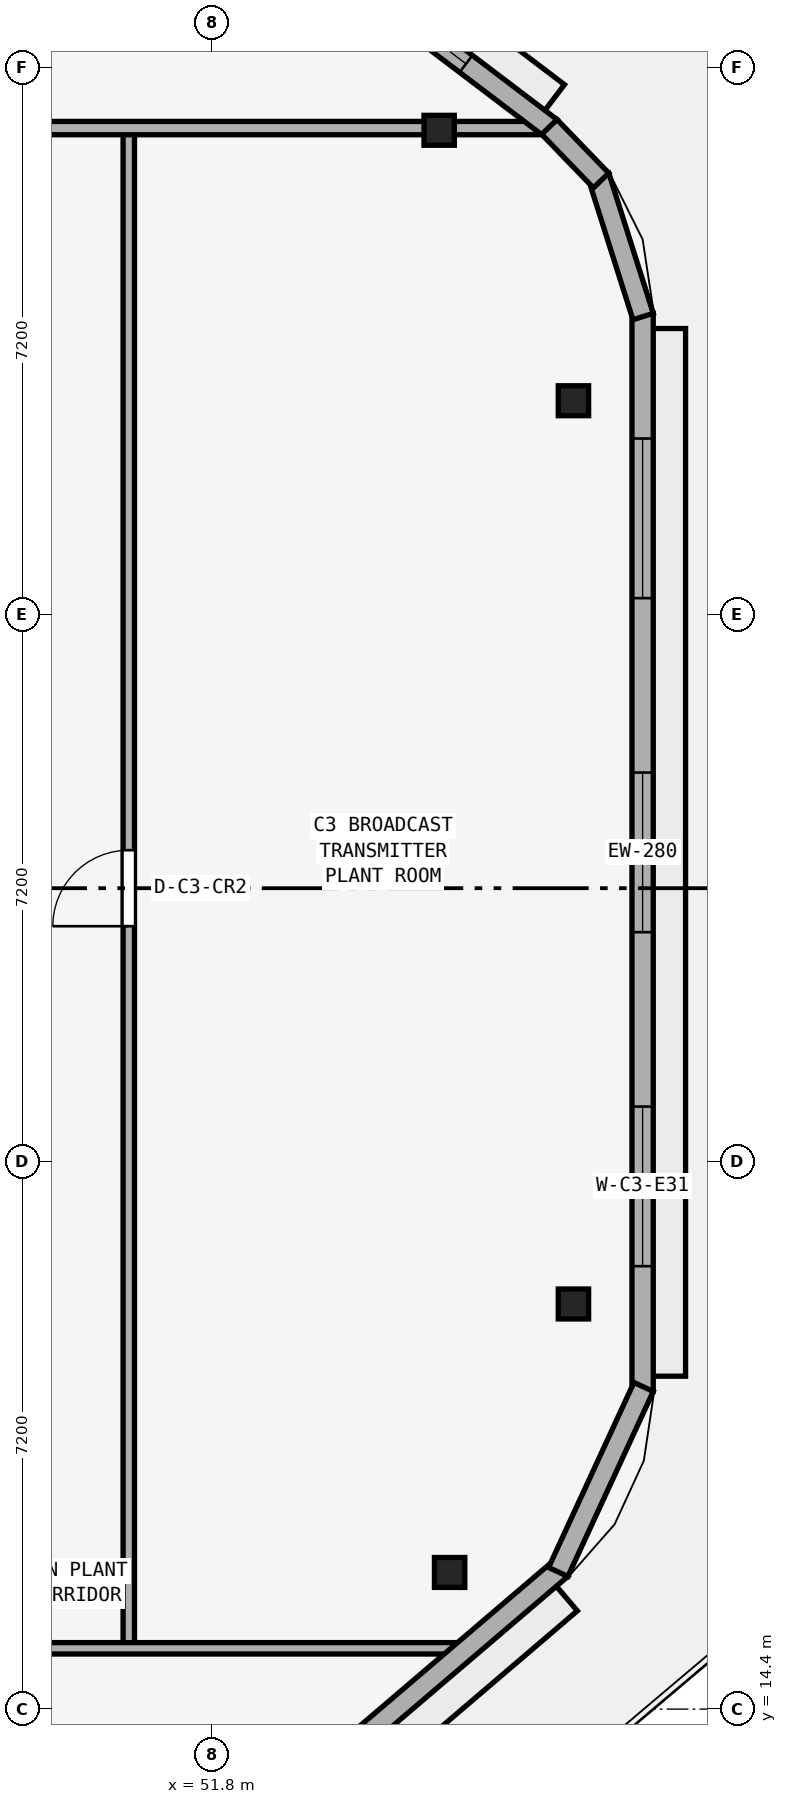
"""IFC4 building model, lengths in metres.
Left out: names, types, materials, properties, quantities, classifications, styles, units other than length and angle.
Written with IfcOpenShell. Run it as: python <this file> out.ifc"""

import sys

from ifc_helpers import new_model, si_unit, direction, frame, frame_2d, origin, origin_2d, place, context, subcontext, project, spatial, rectangle, i_section, extrude, element, fill, save


model = new_model("IFC4")
c1 = context("Model", 3, precision=1e-05, world=origin(), true_north=direction((0.0, 1.0)))
c2 = subcontext(c1, "Body", "Model", "MODEL_VIEW")
j1 = project(units=[si_unit("LENGTHUNIT", "METRE"), si_unit("PLANEANGLEUNIT", "RADIAN")], contexts=[c1])
p1 = place(None, origin())
s1 = spatial("IfcSite", under=j1, at=p1, CompositionType="ELEMENT")
p2 = place(p1, origin())
s2 = spatial("IfcBuilding", under=s1, at=p2, CompositionType="ELEMENT")
p3 = place(p2, frame((0.0, 0.0, 321.4)))
s3 = spatial("IfcBuildingStorey", under=s2, at=p3, CompositionType="ELEMENT", Elevation=321.4)
for number, where, z_axis, x_axis in (
    (1, (54.921, 16.198, 0.0), (0.0, 0.0, 1.0), (1.0, 0.0, 0.0)),
    (2, (56.55, 19.73, 0.0), (0.0, 0.0, 1.0), (1.0, 0.0, 0.0)),
    (3, (56.55, 31.613, 0.0), (0.0, 0.0, 1.0), (1.0, 0.0, 0.0)),
    (4, (54.783, 35.171, 0.0), (0.0, 0.0, 1.0), (1.0, 0.0, 0.0)),
):
    element("IfcColumn", number, at=place(p3, frame(where, z_axis=z_axis, x_axis=x_axis)), inside=s3, PredefinedType="COLUMN", context=c2, shape_type="SweptSolid", body=[
        extrude(i_section(OverallWidth=0.399, OverallDepth=0.394, WebThickness=0.023, FlangeThickness=0.037, at=origin_2d()), origin(), (0.0, 0.0, 1.0), 4.0),
    ])
p4 = place(p3, frame((50.7, 15.2, 0.0), z_axis=(0.0, 0.0, 1.0), x_axis=(0.0, 1.0, 0.0)))
e5 = element("IfcWall", 5, at=p4, inside=s3, PredefinedType="PARTITIONING", context=c2, shape_type="SweptSolid", body=[
    extrude(rectangle(XDim=20.0, YDim=0.15, at=frame_2d((10.0, 0.0))), origin(), (0.0, 0.0, 1.0), 3.72),
])
p5 = place(p4, frame((9.5, 0.0, 0.0)))
e6 = element("IfcOpeningElement", 6, at=p5, cuts=e5, PredefinedType="OPENING", context=c2, shape_type="SweptSolid", body=[
    extrude(rectangle(XDim=1.0, YDim=2.12, at=frame_2d((0.5, 1.06))), frame((0.0, 0.085, 0.0), z_axis=(0.0, -1.0, 0.0), x_axis=(1.0, 0.0, 0.0)), (0.0, 0.0, 1.0), 0.17),
])
p6 = place(p3, frame((24.464, 15.2, 0.0), z_axis=(0.0, 0.0, 1.0), x_axis=(1.0, 0.0, 0.0)))
e7 = element("IfcWall", 7, at=p6, inside=s3, PredefinedType="PARTITIONING", context=c2, shape_type="SweptSolid", body=[
    extrude(rectangle(XDim=30.765, YDim=0.15, at=frame_2d((15.383, 0.0))), origin(), (0.0, 0.0, 1.0), 3.72),
])
p7 = place(p6, frame((14.536, 0.0, 0.0)))
e8 = element("IfcOpeningElement", 8, at=p7, cuts=e7, PredefinedType="OPENING", context=c2, shape_type="SweptSolid", body=[
    extrude(rectangle(XDim=1.0, YDim=2.12, at=frame_2d((0.5, 1.06))), frame((0.0, 0.085, 0.0), z_axis=(0.0, -1.0, 0.0), x_axis=(1.0, 0.0, 0.0)), (0.0, 0.0, 1.0), 0.17),
])
p8 = place(p3, frame((25.074, 35.2, 0.0), z_axis=(0.0, 0.0, 1.0), x_axis=(1.0, 0.0, 0.0)))
e9 = element("IfcWall", 9, at=p8, inside=s3, PredefinedType="PARTITIONING", context=c2, shape_type="SweptSolid", body=[
    extrude(rectangle(XDim=31.228, YDim=0.175, at=frame_2d((15.614, 0.0))), origin(), (0.0, 0.0, 1.0), 3.72),
])
p9 = place(p8, frame((13.926, 0.0, 0.0)))
e10 = element("IfcOpeningElement", 10, at=p9, cuts=e9, PredefinedType="OPENING", context=c2, shape_type="SweptSolid", body=[
    extrude(rectangle(XDim=1.0, YDim=2.12, at=frame_2d((0.5, 1.06))), frame((0.0, 0.097, 0.0), z_axis=(0.0, -1.0, 0.0), x_axis=(1.0, 0.0, 0.0)), (0.0, 0.0, 1.0), 0.195),
])
p10 = place(p3, frame((47.371, 8.558, 0.0), z_axis=(0.0, 0.0, 1.0), x_axis=(0.760637685394, 0.649176641261, 0.0)))
e11 = element("IfcWall", 11, at=p10, inside=s3, PredefinedType="STANDARD", context=c2, shape_type="SweptSolid", body=[
    extrude(rectangle(XDim=11.852, YDim=0.28, at=frame_2d((5.926, 0.0))), origin(), (0.0, 0.0, 1.0), 3.72),
])
p11 = place(p10, frame((1.509, 0.0, 0.9)))
e12 = element("IfcOpeningElement", 12, at=p11, cuts=e11, PredefinedType="OPENING", context=c2, shape_type="SweptSolid", body=[
    extrude(rectangle(XDim=1.6, YDim=1.45, at=frame_2d((0.8, 0.725))), frame((0.0, 0.15, 0.0), z_axis=(0.0, -1.0, 0.0), x_axis=(1.0, 0.0, 0.0)), (0.0, 0.0, 1.0), 0.3),
])
p12 = place(p10, frame((5.126, 0.0, 0.9)))
e13 = element("IfcOpeningElement", 13, at=p12, cuts=e11, PredefinedType="OPENING", context=c2, shape_type="SweptSolid", body=[
    extrude(rectangle(XDim=1.6, YDim=1.45, at=frame_2d((0.8, 0.725))), frame((0.0, 0.15, 0.0), z_axis=(0.0, -1.0, 0.0), x_axis=(1.0, 0.0, 0.0)), (0.0, 0.0, 1.0), 0.3),
])
p13 = place(p3, frame((57.46, 18.58, 0.0), z_axis=(0.0, 0.0, 1.0), x_axis=(0.0, 1.0, 0.0)))
e14 = element("IfcWall", 14, at=p13, inside=s3, PredefinedType="STANDARD", context=c2, shape_type="SweptSolid", body=[
    extrude(rectangle(XDim=14.183, YDim=0.28, at=frame_2d((7.092, 0.0))), origin(), (0.0, 0.0, 1.0), 3.72),
])
p14 = place(p13, frame((1.647, 0.0, 0.9)))
e15 = element("IfcOpeningElement", 15, at=p14, cuts=e14, PredefinedType="OPENING", context=c2, shape_type="SweptSolid", body=[
    extrude(rectangle(XDim=2.1, YDim=1.7, at=frame_2d((1.05, 0.85))), frame((0.0, 0.15, 0.0), z_axis=(0.0, -1.0, 0.0), x_axis=(1.0, 0.0, 0.0)), (0.0, 0.0, 1.0), 0.3),
])
p15 = place(p13, frame((6.042, 0.0, 0.9)))
e16 = element("IfcOpeningElement", 16, at=p15, cuts=e14, PredefinedType="OPENING", context=c2, shape_type="SweptSolid", body=[
    extrude(rectangle(XDim=2.1, YDim=1.7, at=frame_2d((1.05, 0.85))), frame((0.0, 0.15, 0.0), z_axis=(0.0, -1.0, 0.0), x_axis=(1.0, 0.0, 0.0)), (0.0, 0.0, 1.0), 0.3),
])
p16 = place(p13, frame((10.436, 0.0, 0.9)))
e17 = element("IfcOpeningElement", 17, at=p16, cuts=e14, PredefinedType="OPENING", context=c2, shape_type="SweptSolid", body=[
    extrude(rectangle(XDim=2.1, YDim=1.7, at=frame_2d((1.05, 0.85))), frame((0.0, 0.15, 0.0), z_axis=(0.0, -1.0, 0.0), x_axis=(1.0, 0.0, 0.0)), (0.0, 0.0, 1.0), 0.3),
])
p17 = place(p3, frame((56.25, 35.201, 0.0), z_axis=(0.0, 0.0, 1.0), x_axis=(-0.796694895732, 0.60438170316, 0.0)))
e18 = element("IfcWall", 18, at=p17, inside=s3, PredefinedType="STANDARD", context=c2, shape_type="SweptSolid", body=[
    extrude(rectangle(XDim=11.183, YDim=0.28, at=frame_2d((5.591, 0.0))), origin(), (0.0, 0.0, 1.0), 3.72),
])
p18 = place(p17, frame((1.397, 0.0, 0.9)))
e19 = element("IfcOpeningElement", 19, at=p18, cuts=e18, PredefinedType="OPENING", context=c2, shape_type="SweptSolid", body=[
    extrude(rectangle(XDim=1.6, YDim=1.45, at=frame_2d((0.8, 0.725))), frame((0.0, 0.15, 0.0), z_axis=(0.0, -1.0, 0.0), x_axis=(1.0, 0.0, 0.0)), (0.0, 0.0, 1.0), 0.3),
])
p19 = place(p17, frame((4.792, 0.0, 0.9)))
e20 = element("IfcOpeningElement", 20, at=p19, cuts=e18, PredefinedType="OPENING", context=c2, shape_type="SweptSolid", body=[
    extrude(rectangle(XDim=1.6, YDim=1.45, at=frame_2d((0.8, 0.725))), frame((0.0, 0.15, 0.0), z_axis=(0.0, -1.0, 0.0), x_axis=(1.0, 0.0, 0.0)), (0.0, 0.0, 1.0), 0.3),
])
p20 = place(p17, frame((8.186, 0.0, 0.9)))
e21 = element("IfcOpeningElement", 21, at=p20, cuts=e18, PredefinedType="OPENING", context=c2, shape_type="SweptSolid", body=[
    extrude(rectangle(XDim=1.6, YDim=1.45, at=frame_2d((0.8, 0.725))), frame((0.0, 0.15, 0.0), z_axis=(0.0, -1.0, 0.0), x_axis=(1.0, 0.0, 0.0)), (0.0, 0.0, 1.0), 0.3),
])
p21 = place(p3, frame((56.35, 16.205, 0.0), z_axis=(0.0, 0.0, 1.0), x_axis=(0.418902215131, 0.908031350868, 0.0)))
e22 = element("IfcWall", 22, at=p21, inside=s3, PredefinedType="STANDARD", context=c2, shape_type="SweptSolid", body=[
    extrude(rectangle(XDim=2.68, YDim=0.28, at=frame_2d((1.34, 0.0))), origin(), (0.0, 0.0, 1.0), 3.72),
])
p22 = place(p3, frame((57.467, 32.721, 0.0), z_axis=(0.0, 0.0, 1.0), x_axis=(-0.302459091708, 0.953162366988, 0.0)))
e23 = element("IfcWall", 23, at=p22, inside=s3, PredefinedType="STANDARD", context=c2, shape_type="SweptSolid", body=[
    extrude(rectangle(XDim=1.936, YDim=0.28, at=frame_2d((0.968, 0.0))), origin(), (0.0, 0.0, 1.0), 3.72),
])
p23 = place(p3, frame((56.914, 34.511, 0.0), z_axis=(0.0, 0.0, 1.0), x_axis=(-0.694785794461, 0.719216726595, 0.0)))
e24 = element("IfcWall", 24, at=p23, inside=s3, PredefinedType="STANDARD", context=c2, shape_type="SweptSolid", body=[
    extrude(rectangle(XDim=0.979, YDim=0.28, at=frame_2d((0.49, 0.0))), origin(), (0.0, 0.0, 1.0), 3.72),
])
p24 = place(p5, origin())
e25 = element("IfcDoor", 25, at=p24, inside=s3, OperationType="SINGLE_SWING_LEFT", PredefinedType="DOOR", context=c2, shape_type="SweptSolid", body=[
    extrude(rectangle(XDim=1.0, YDim=2.12, at=frame_2d((0.5, 1.06))), frame((0.0, 0.025, 0.0), z_axis=(0.0, -1.0, 0.0), x_axis=(1.0, 0.0, 0.0)), (0.0, 0.0, 1.0), 0.05),
])
fill(e6, e25)
p25 = place(p14, origin())
e26 = element("IfcWindow", 26, at=p25, inside=s3, PartitioningType="SINGLE_PANEL", PredefinedType="WINDOW", context=c2, shape_type="SweptSolid", body=[
    extrude(rectangle(XDim=2.1, YDim=1.7, at=frame_2d((1.05, 0.85))), frame((0.0, 0.03, 0.0), z_axis=(0.0, -1.0, 0.0), x_axis=(1.0, 0.0, 0.0)), (0.0, 0.0, 1.0), 0.06),
])
fill(e15, e26)
p26 = place(p15, origin())
e27 = element("IfcWindow", 27, at=p26, inside=s3, PartitioningType="SINGLE_PANEL", PredefinedType="WINDOW", context=c2, shape_type="SweptSolid", body=[
    extrude(rectangle(XDim=2.1, YDim=1.7, at=frame_2d((1.05, 0.85))), frame((0.0, 0.03, 0.0), z_axis=(0.0, -1.0, 0.0), x_axis=(1.0, 0.0, 0.0)), (0.0, 0.0, 1.0), 0.06),
])
fill(e16, e27)
p27 = place(p16, origin())
e28 = element("IfcWindow", 28, at=p27, inside=s3, PartitioningType="SINGLE_PANEL", PredefinedType="WINDOW", context=c2, shape_type="SweptSolid", body=[
    extrude(rectangle(XDim=2.1, YDim=1.7, at=frame_2d((1.05, 0.85))), frame((0.0, 0.03, 0.0), z_axis=(0.0, -1.0, 0.0), x_axis=(1.0, 0.0, 0.0)), (0.0, 0.0, 1.0), 0.06),
])
fill(e17, e28)
p28 = place(p18, origin())
e29 = element("IfcWindow", 29, at=p28, inside=s3, PartitioningType="SINGLE_PANEL", PredefinedType="WINDOW", context=c2, shape_type="SweptSolid", body=[
    extrude(rectangle(XDim=1.6, YDim=1.45, at=frame_2d((0.8, 0.725))), frame((0.0, 0.03, 0.0), z_axis=(0.0, -1.0, 0.0), x_axis=(1.0, 0.0, 0.0)), (0.0, 0.0, 1.0), 0.06),
])
fill(e19, e29)
save(model, sys.argv[1])
